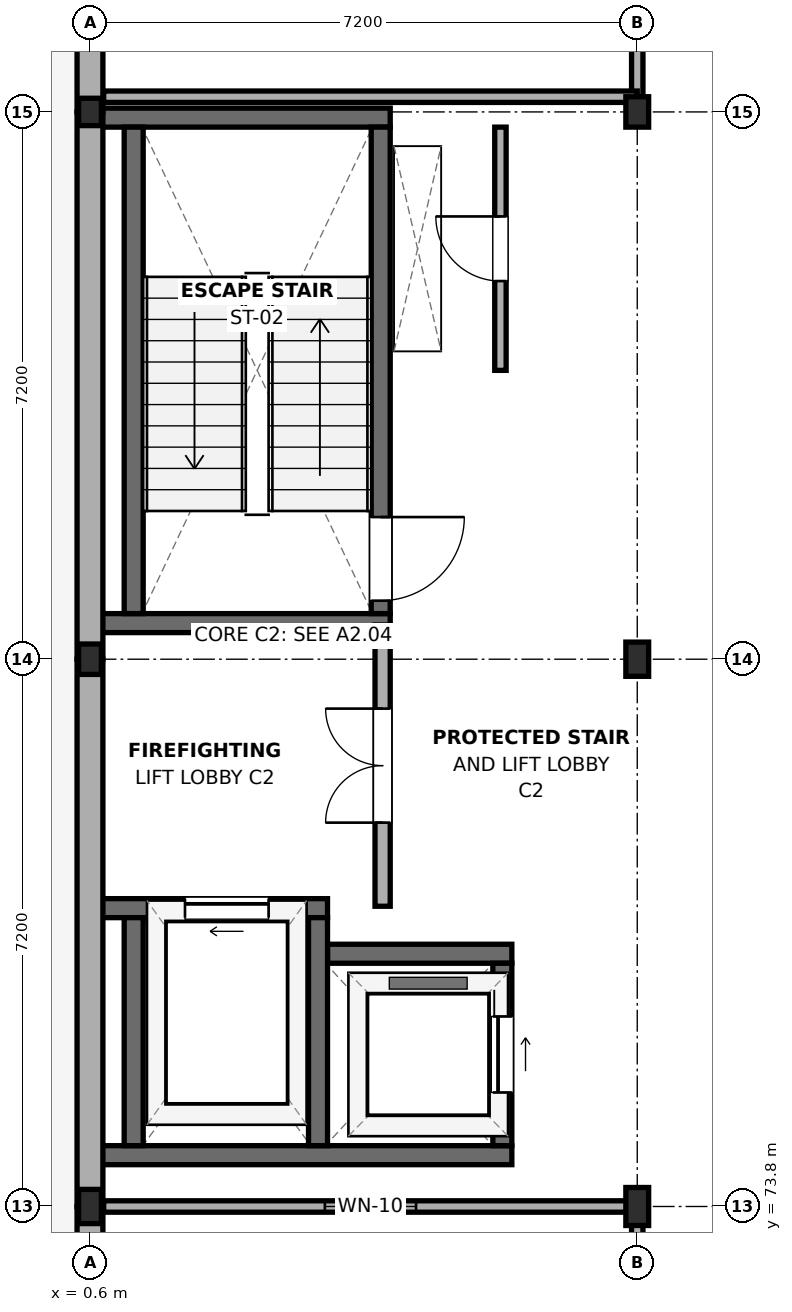
"""IFC4 building model, lengths in metres.
Left out: names, types, materials, properties, quantities, classifications, styles, units other than length and angle.
Written with IfcOpenShell. Run it as: python <this file> out.ifc"""

import sys

from ifc_helpers import new_model, si_unit, direction, frame, frame_2d, origin, origin_2d, place, context, subcontext, project, spatial, rectangle, i_section, extrude, element, fill, save


model = new_model("IFC4")
c1 = context("Model", 3, precision=1e-05, world=origin(), true_north=direction((0.0, 1.0)))
c2 = subcontext(c1, "Body", "Model", "MODEL_VIEW")
j1 = project(units=[si_unit("LENGTHUNIT", "METRE"), si_unit("PLANEANGLEUNIT", "RADIAN")], contexts=[c1])
p1 = place(None, origin())
s1 = spatial("IfcSite", under=j1, at=p1, CompositionType="ELEMENT")
p2 = place(p1, origin())
s2 = spatial("IfcBuilding", under=s1, at=p2, CompositionType="ELEMENT")
p3 = place(p2, frame((0.0, 0.0, 17.1)))
s3 = spatial("IfcBuildingStorey", under=s2, at=p3, CompositionType="ELEMENT", Elevation=17.1)
p4 = place(p3, frame((0.6, 73.8, 0.0), z_axis=(0.0, 0.0, 1.0), x_axis=(1.0, 0.0, 0.0)))
e1 = element("IfcColumn", 1, at=p4, inside=s3, PredefinedType="COLUMN", context=c2, shape_type="SweptSolid", body=[
    extrude(i_section(OverallWidth=0.3, OverallDepth=0.45, WebThickness=0.014, FlangeThickness=0.026, FilletRadius=0.027, at=origin_2d()), origin(), (0.0, 0.0, 1.0), 3.9),
])
p5 = place(p3, frame((0.6, 81.0, 0.0), z_axis=(0.0, 0.0, 1.0), x_axis=(1.0, 0.0, 0.0)))
e2 = element("IfcColumn", 2, at=p5, inside=s3, PredefinedType="COLUMN", context=c2, shape_type="SweptSolid", body=[
    extrude(i_section(OverallWidth=0.3, OverallDepth=0.4, WebThickness=0.013, FlangeThickness=0.024, FilletRadius=0.027, at=origin_2d()), origin(), (0.0, 0.0, 1.0), 3.9),
])
p6 = place(p3, frame((0.6, 88.2, 0.0), z_axis=(0.0, 0.0, 1.0), x_axis=(1.0, 0.0, 0.0)))
e3 = element("IfcColumn", 3, at=p6, inside=s3, PredefinedType="COLUMN", context=c2, shape_type="SweptSolid", body=[
    extrude(i_section(OverallWidth=0.3, OverallDepth=0.36, WebThickness=0.012, FlangeThickness=0.022, FilletRadius=0.027, at=origin_2d()), origin(), (0.0, 0.0, 1.0), 3.9),
])
p7 = place(p3, frame((7.8, 73.8, 0.0), z_axis=(0.0, 0.0, 1.0), x_axis=(1.0, 0.0, 0.0)))
e4 = element("IfcColumn", 4, at=p7, inside=s3, PredefinedType="COLUMN", context=c2, shape_type="SweptSolid", body=[
    extrude(i_section(OverallWidth=0.3, OverallDepth=0.5, WebThickness=0.014, FlangeThickness=0.028, FilletRadius=0.027, at=origin_2d()), origin(), (0.0, 0.0, 1.0), 3.9),
])
p8 = place(p3, frame((7.8, 81.0, 0.0), z_axis=(0.0, 0.0, 1.0), x_axis=(1.0, 0.0, 0.0)))
e5 = element("IfcColumn", 5, at=p8, inside=s3, PredefinedType="COLUMN", context=c2, shape_type="SweptSolid", body=[
    extrude(i_section(OverallWidth=0.3, OverallDepth=0.45, WebThickness=0.014, FlangeThickness=0.026, FilletRadius=0.027, at=origin_2d()), origin(), (0.0, 0.0, 1.0), 3.9),
])
p9 = place(p3, frame((7.8, 88.2, 0.0), z_axis=(0.0, 0.0, 1.0), x_axis=(1.0, 0.0, 0.0)))
e6 = element("IfcColumn", 6, at=p9, inside=s3, PredefinedType="COLUMN", context=c2, shape_type="SweptSolid", body=[
    extrude(i_section(OverallWidth=0.3, OverallDepth=0.4, WebThickness=0.013, FlangeThickness=0.024, FilletRadius=0.027, at=origin_2d()), origin(), (0.0, 0.0, 1.0), 3.9),
])
for number, where, z_axis, x_axis in (
    (7, (0.75, 81.475, 0.0), (0.0, 0.0, 1.0), (1.0, 0.0, 0.0)),
    (8, (0.75, 88.125, 0.0), (0.0, 0.0, 1.0), (1.0, 0.0, 0.0)),
):
    element("IfcWall", number, at=place(p3, frame(where, z_axis=z_axis, x_axis=x_axis)), inside=s3, PredefinedType="SHEAR", context=c2, shape_type="SweptSolid", body=[
        extrude(rectangle(XDim=3.8, YDim=0.25, at=frame_2d((1.9, 0.0))), origin(), (0.0, 0.0, 1.0), 3.7),
    ])
p10 = place(p3, frame((1.175, 81.6, 0.0), z_axis=(0.0, 0.0, 1.0), x_axis=(0.0, 1.0, 0.0)))
e9 = element("IfcWall", 9, at=p10, inside=s3, PredefinedType="SHEAR", context=c2, shape_type="SweptSolid", body=[
    extrude(rectangle(XDim=6.4, YDim=0.25, at=frame_2d((3.2, 0.0))), origin(), (0.0, 0.0, 1.0), 3.7),
])
p11 = place(p3, frame((4.425, 81.6, 0.0), z_axis=(0.0, 0.0, 1.0), x_axis=(0.0, 1.0, 0.0)))
e10 = element("IfcWall", 10, at=p11, inside=s3, PredefinedType="SHEAR", context=c2, shape_type="SweptSolid", body=[
    extrude(rectangle(XDim=6.4, YDim=0.25, at=frame_2d((3.2, 0.0))), origin(), (0.0, 0.0, 1.0), 3.7),
])
p12 = place(p11, frame((0.17, 0.0, 0.0)))
e11 = element("IfcOpeningElement", 11, at=p12, cuts=e10, PredefinedType="OPENING", context=c2, shape_type="SweptSolid", body=[
    extrude(rectangle(XDim=1.1, YDim=2.15, at=frame_2d((0.55, 1.075))), frame((0.0, 0.14, 0.0), z_axis=(0.0, -1.0, 0.0), x_axis=(1.0, 0.0, 0.0)), (0.0, 0.0, 1.0), 0.28),
])
p13 = place(p3, frame((0.75, 74.475, 0.0), z_axis=(0.0, 0.0, 1.0), x_axis=(1.0, 0.0, 0.0)))
e12 = element("IfcWall", 12, at=p13, inside=s3, PredefinedType="SHEAR", context=c2, shape_type="SweptSolid", body=[
    extrude(rectangle(XDim=5.4, YDim=0.25, at=frame_2d((2.7, 0.0))), origin(), (0.0, 0.0, 1.0), 3.7),
])
p14 = place(p3, frame((0.75, 77.725, 0.0), z_axis=(0.0, 0.0, 1.0), x_axis=(1.0, 0.0, 0.0)))
e13 = element("IfcWall", 13, at=p14, inside=s3, PredefinedType="SHEAR", context=c2, shape_type="SweptSolid", body=[
    extrude(rectangle(XDim=2.975, YDim=0.25, at=frame_2d((1.488, 0.0))), origin(), (0.0, 0.0, 1.0), 3.7),
])
p15 = place(p14, frame((1.1, 0.0, 0.0)))
e14 = element("IfcOpeningElement", 14, at=p15, cuts=e13, PredefinedType="OPENING", context=c2, shape_type="SweptSolid", body=[
    extrude(rectangle(XDim=1.1, YDim=2.15, at=frame_2d((0.55, 1.075))), frame((0.0, 0.14, 0.0), z_axis=(0.0, -1.0, 0.0), x_axis=(1.0, 0.0, 0.0)), (0.0, 0.0, 1.0), 0.28),
])
p16 = place(p3, frame((3.725, 77.125, 0.0), z_axis=(0.0, 0.0, 1.0), x_axis=(1.0, 0.0, 0.0)))
e15 = element("IfcWall", 15, at=p16, inside=s3, PredefinedType="SHEAR", context=c2, shape_type="SweptSolid", body=[
    extrude(rectangle(XDim=2.425, YDim=0.25, at=frame_2d((1.212, 0.0))), origin(), (0.0, 0.0, 1.0), 3.7),
])
for number, where, z_axis, x_axis in (
    (16, (1.175, 74.6, 0.0), (0.0, 0.0, 1.0), (0.0, 1.0, 0.0)),
    (17, (3.6, 74.6, 0.0), (0.0, 0.0, 1.0), (0.0, 1.0, 0.0)),
):
    element("IfcWall", number, at=place(p3, frame(where, z_axis=z_axis, x_axis=x_axis)), inside=s3, PredefinedType="SHEAR", context=c2, shape_type="SweptSolid", body=[
        extrude(rectangle(XDim=3.0, YDim=0.25, at=frame_2d((1.5, 0.0))), origin(), (0.0, 0.0, 1.0), 3.7),
    ])
p17 = place(p3, frame((6.025, 74.6, 0.0), z_axis=(0.0, 0.0, 1.0), x_axis=(0.0, 1.0, 0.0)))
e18 = element("IfcWall", 18, at=p17, inside=s3, PredefinedType="SHEAR", context=c2, shape_type="SweptSolid", body=[
    extrude(rectangle(XDim=2.4, YDim=0.25, at=frame_2d((1.2, 0.0))), origin(), (0.0, 0.0, 1.0), 3.7),
])
p18 = place(p17, frame((0.7, 0.0, 0.0)))
e19 = element("IfcOpeningElement", 19, at=p18, cuts=e18, PredefinedType="OPENING", context=c2, shape_type="SweptSolid", body=[
    extrude(rectangle(XDim=1.0, YDim=2.15, at=frame_2d((0.5, 1.075))), frame((0.0, 0.14, 0.0), z_axis=(0.0, -1.0, 0.0), x_axis=(1.0, 0.0, 0.0)), (0.0, 0.0, 1.0), 0.28),
])
p19 = place(p3, frame((0.6, 66.6, 0.0), z_axis=(0.0, 0.0, 1.0), x_axis=(0.0, 1.0, 0.0)))
e20 = element("IfcWall", 20, at=p19, inside=s3, PredefinedType="SOLIDWALL", context=c2, shape_type="SweptSolid", body=[
    extrude(rectangle(XDim=7.2, YDim=0.34, at=frame_2d((3.6, 0.0))), origin(), (0.0, 0.0, 1.0), 3.095),
])
p20 = place(p19, frame((2.6, 0.0, 0.9)))
e21 = element("IfcOpeningElement", 21, at=p20, cuts=e20, PredefinedType="OPENING", context=c2, shape_type="SweptSolid", body=[
    extrude(rectangle(XDim=2.0, YDim=1.8, at=frame_2d((1.0, 0.9))), frame((0.0, 0.185, 0.0), z_axis=(0.0, -1.0, 0.0), x_axis=(1.0, 0.0, 0.0)), (0.0, 0.0, 1.0), 0.37),
])
p21 = place(p3, frame((0.6, 73.8, 0.0), z_axis=(0.0, 0.0, 1.0), x_axis=(0.0, 1.0, 0.0)))
e22 = element("IfcWall", 22, at=p21, inside=s3, PredefinedType="SOLIDWALL", context=c2, shape_type="SweptSolid", body=[
    extrude(rectangle(XDim=7.2, YDim=0.34, at=frame_2d((3.6, 0.0))), origin(), (0.0, 0.0, 1.0), 3.145),
])
p22 = place(p3, frame((0.6, 81.0, 0.0), z_axis=(0.0, 0.0, 1.0), x_axis=(0.0, 1.0, 0.0)))
e23 = element("IfcWall", 23, at=p22, inside=s3, PredefinedType="SOLIDWALL", context=c2, shape_type="SweptSolid", body=[
    extrude(rectangle(XDim=7.2, YDim=0.34, at=frame_2d((3.6, 0.0))), origin(), (0.0, 0.0, 1.0), 3.195),
])
p23 = place(p3, frame((0.6, 88.2, 0.0), z_axis=(0.0, 0.0, 1.0), x_axis=(0.0, 1.0, 0.0)))
e24 = element("IfcWall", 24, at=p23, inside=s3, PredefinedType="SOLIDWALL", context=c2, shape_type="SweptSolid", body=[
    extrude(rectangle(XDim=7.8, YDim=0.34, at=frame_2d((3.9, 0.0))), origin(), (0.0, 0.0, 1.0), 3.155),
])
p24 = place(p3, frame((4.45, 77.75, 0.0), z_axis=(0.0, 0.0, 1.0), x_axis=(0.0, 1.0, 0.0)))
e25 = element("IfcWall", 25, at=p24, inside=s3, PredefinedType="PARTITIONING", context=c2, shape_type="SweptSolid", body=[
    extrude(rectangle(XDim=3.7, YDim=0.2, at=frame_2d((1.85, 0.0))), origin(), (0.0, 0.0, 1.0), 3.345),
])
p25 = place(p24, frame((1.1, 0.0, 0.0)))
e26 = element("IfcOpeningElement", 26, at=p25, cuts=e25, PredefinedType="OPENING", context=c2, shape_type="SweptSolid", body=[
    extrude(rectangle(XDim=1.5, YDim=2.15, at=frame_2d((0.75, 1.075))), frame((0.0, 0.115, 0.0), z_axis=(0.0, -1.0, 0.0), x_axis=(1.0, 0.0, 0.0)), (0.0, 0.0, 1.0), 0.23),
])
p26 = place(p3, frame((6.0, 84.8, 0.0), z_axis=(0.0, 0.0, 1.0), x_axis=(0.0, 1.0, 0.0)))
e27 = element("IfcWall", 27, at=p26, inside=s3, PredefinedType="PARTITIONING", context=c2, shape_type="SweptSolid", body=[
    extrude(rectangle(XDim=3.2, YDim=0.15, at=frame_2d((1.6, 0.0))), origin(), (0.0, 0.0, 1.0), 3.145),
])
p27 = place(p26, frame((1.175, 0.0, 0.0)))
e28 = element("IfcOpeningElement", 28, at=p27, cuts=e27, PredefinedType="OPENING", context=c2, shape_type="SweptSolid", body=[
    extrude(rectangle(XDim=0.85, YDim=2.1, at=frame_2d((0.425, 1.05))), frame((0.0, 0.09, 0.0), z_axis=(0.0, -1.0, 0.0), x_axis=(1.0, 0.0, 0.0)), (0.0, 0.0, 1.0), 0.18),
])
p28 = place(p3, frame((7.8, 58.8, 0.0), z_axis=(0.0, 0.0, 1.0), x_axis=(0.0, 1.0, 0.0)))
e29 = element("IfcWall", 29, at=p28, inside=s3, PredefinedType="PARTITIONING", context=c2, shape_type="SweptSolid", body=[
    extrude(rectangle(XDim=15.0, YDim=0.15, at=frame_2d((7.5, 0.0))), origin(), (0.0, 0.0, 1.0), 3.095),
])
p29 = place(p28, frame((6.525, 0.0, 0.0)))
e30 = element("IfcOpeningElement", 30, at=p29, cuts=e29, PredefinedType="OPENING", context=c2, shape_type="SweptSolid", body=[
    extrude(rectangle(XDim=1.05, YDim=2.15, at=frame_2d((0.525, 1.075))), frame((0.0, 0.09, 0.0), z_axis=(0.0, -1.0, 0.0), x_axis=(1.0, 0.0, 0.0)), (0.0, 0.0, 1.0), 0.18),
])
p30 = place(p28, frame((9.5, 0.0, 0.95)))
e31 = element("IfcOpeningElement", 31, at=p30, cuts=e29, PredefinedType="OPENING", context=c2, shape_type="SweptSolid", body=[
    extrude(rectangle(XDim=2.6, YDim=1.5, at=frame_2d((1.3, 0.75))), frame((0.0, 0.09, 0.0), z_axis=(0.0, -1.0, 0.0), x_axis=(1.0, 0.0, 0.0)), (0.0, 0.0, 1.0), 0.18),
])
p31 = place(p3, frame((0.78, 73.8, 0.0), z_axis=(0.0, 0.0, 1.0), x_axis=(1.0, 0.0, 0.0)))
e32 = element("IfcWall", 32, at=p31, inside=s3, PredefinedType="PARTITIONING", context=c2, shape_type="SweptSolid", body=[
    extrude(rectangle(XDim=7.02, YDim=0.15, at=frame_2d((3.51, 0.0))), origin(), (0.0, 0.0, 1.0), 3.145),
])
p32 = place(p31, frame((2.91, 0.0, 0.95)))
e33 = element("IfcOpeningElement", 33, at=p32, cuts=e32, PredefinedType="OPENING", context=c2, shape_type="SweptSolid", body=[
    extrude(rectangle(XDim=1.2, YDim=1.5, at=frame_2d((0.6, 0.75))), frame((0.0, 0.09, 0.0), z_axis=(0.0, -1.0, 0.0), x_axis=(1.0, 0.0, 0.0)), (0.0, 0.0, 1.0), 0.18),
])
p33 = place(p3, frame((7.8, 88.4, 0.0), z_axis=(0.0, 0.0, 1.0), x_axis=(0.0, 1.0, 0.0)))
e34 = element("IfcWall", 34, at=p33, inside=s3, PredefinedType="PARTITIONING", context=c2, shape_type="SweptSolid", body=[
    extrude(rectangle(XDim=25.0, YDim=0.15, at=frame_2d((12.5, 0.0))), origin(), (0.0, 0.0, 1.0), 3.105),
])
p34 = place(p33, frame((11.7, 0.0, 0.0)))
e35 = element("IfcOpeningElement", 35, at=p34, cuts=e34, PredefinedType="OPENING", context=c2, shape_type="SweptSolid", body=[
    extrude(rectangle(XDim=1.6, YDim=2.15, at=frame_2d((0.8, 1.075))), frame((0.0, 0.09, 0.0), z_axis=(0.0, -1.0, 0.0), x_axis=(1.0, 0.0, 0.0)), (0.0, 0.0, 1.0), 0.18),
])
p35 = place(p33, frame((17.45, 0.0, 0.95)))
e36 = element("IfcOpeningElement", 36, at=p35, cuts=e34, PredefinedType="OPENING", context=c2, shape_type="SweptSolid", body=[
    extrude(rectangle(XDim=2.6, YDim=1.5, at=frame_2d((1.3, 0.75))), frame((0.0, 0.09, 0.0), z_axis=(0.0, -1.0, 0.0), x_axis=(1.0, 0.0, 0.0)), (0.0, 0.0, 1.0), 0.18),
])
p36 = place(p3, frame((0.78, 88.4, 0.0), z_axis=(0.0, 0.0, 1.0), x_axis=(1.0, 0.0, 0.0)))
e37 = element("IfcWall", 37, at=p36, inside=s3, PredefinedType="PARTITIONING", context=c2, shape_type="SweptSolid", body=[
    extrude(rectangle(XDim=7.02, YDim=0.15, at=frame_2d((3.51, 0.0))), origin(), (0.0, 0.0, 1.0), 3.145),
])
p37 = place(p12, frame((1.1, 0.0, 0.0), z_axis=(0.0, 0.0, 1.0), x_axis=(-1.0, 0.0, 0.0)))
e38 = element("IfcDoor", 38, at=p37, inside=s3, OperationType="SINGLE_SWING_LEFT", PredefinedType="DOOR", context=c2, shape_type="SweptSolid", body=[
    extrude(rectangle(XDim=1.1, YDim=2.15, at=frame_2d((0.55, 1.075))), frame((0.0, 0.025, 0.0), z_axis=(0.0, -1.0, 0.0), x_axis=(1.0, 0.0, 0.0)), (0.0, 0.0, 1.0), 0.05),
])
fill(e11, e38)
p38 = place(p15, origin())
e39 = element("IfcDoor", 39, at=p38, inside=s3, OperationType="SLIDING_TO_LEFT", PredefinedType="DOOR", context=c2, shape_type="SweptSolid", body=[
    extrude(rectangle(XDim=1.1, YDim=2.15, at=frame_2d((0.55, 1.075))), frame((0.0, 0.025, 0.0), z_axis=(0.0, -1.0, 0.0), x_axis=(1.0, 0.0, 0.0)), (0.0, 0.0, 1.0), 0.05),
])
fill(e14, e39)
p39 = place(p18, frame((1.0, 0.0, 0.0), z_axis=(0.0, 0.0, 1.0), x_axis=(-1.0, 0.0, 0.0)))
e40 = element("IfcDoor", 40, at=p39, inside=s3, OperationType="SLIDING_TO_RIGHT", PredefinedType="DOOR", context=c2, shape_type="SweptSolid", body=[
    extrude(rectangle(XDim=1.0, YDim=2.15, at=frame_2d((0.5, 1.075))), frame((0.0, 0.025, 0.0), z_axis=(0.0, -1.0, 0.0), x_axis=(1.0, 0.0, 0.0)), (0.0, 0.0, 1.0), 0.05),
])
fill(e19, e40)
p40 = place(p25, origin())
e41 = element("IfcDoor", 41, at=p40, inside=s3, OperationType="DOUBLE_DOOR_SINGLE_SWING", PredefinedType="DOOR", context=c2, shape_type="SweptSolid", body=[
    extrude(rectangle(XDim=1.5, YDim=2.15, at=frame_2d((0.75, 1.075))), frame((0.0, 0.025, 0.0), z_axis=(0.0, -1.0, 0.0), x_axis=(1.0, 0.0, 0.0)), (0.0, 0.0, 1.0), 0.05),
])
fill(e26, e41)
p41 = place(p27, origin())
e42 = element("IfcDoor", 42, at=p41, inside=s3, OperationType="SINGLE_SWING_RIGHT", PredefinedType="DOOR", context=c2, shape_type="SweptSolid", body=[
    extrude(rectangle(XDim=0.85, YDim=2.1, at=frame_2d((0.425, 1.05))), frame((0.0, 0.025, 0.0), z_axis=(0.0, -1.0, 0.0), x_axis=(1.0, 0.0, 0.0)), (0.0, 0.0, 1.0), 0.05),
])
fill(e28, e42)
p42 = place(p32, origin())
e43 = element("IfcWindow", 43, at=p42, inside=s3, PartitioningType="SINGLE_PANEL", PredefinedType="WINDOW", context=c2, shape_type="SweptSolid", body=[
    extrude(rectangle(XDim=1.2, YDim=1.5, at=frame_2d((0.6, 0.75))), frame((0.0, 0.03, 0.0), z_axis=(0.0, -1.0, 0.0), x_axis=(1.0, 0.0, 0.0)), (0.0, 0.0, 1.0), 0.06),
])
fill(e33, e43)
save(model, sys.argv[1])
